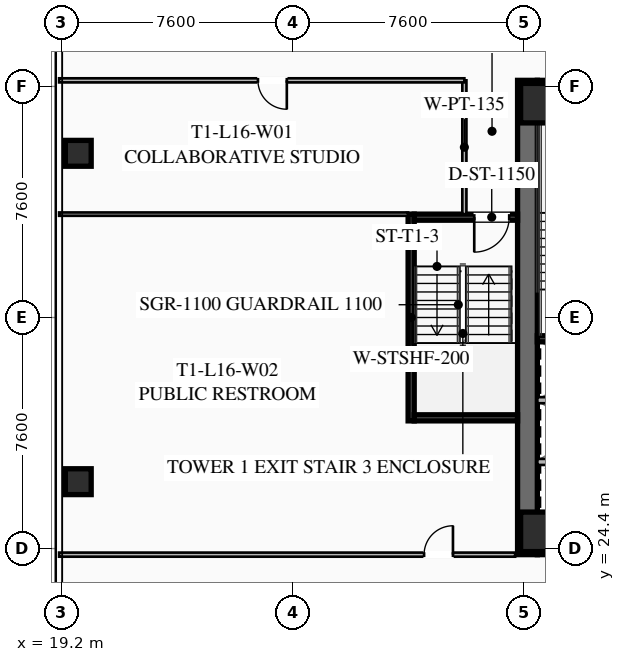
"""IFC4 building model, lengths in metres.
Left out: names, types, materials, properties, quantities, classifications, styles, units other than length and angle.
Written with IfcOpenShell. Run it as: python <this file> out.ifc"""

import sys

from ifc_helpers import new_model, si_unit, direction, frame, frame_2d, origin, origin_2d, place, context, subcontext, project, spatial, rectangle, hollow_rectangle, extrude, element, fill, save


model = new_model("IFC4")
c1 = context("Model", 3, precision=1e-05, world=origin(), true_north=direction((0.0, 1.0)))
c2 = subcontext(c1, "Body", "Model", "MODEL_VIEW")
j1 = project(units=[si_unit("LENGTHUNIT", "METRE"), si_unit("PLANEANGLEUNIT", "RADIAN")], contexts=[c1])
p1 = place(None, origin())
s1 = spatial("IfcSite", under=j1, at=p1, CompositionType="ELEMENT")
p2 = place(p1, origin())
s2 = spatial("IfcBuilding", under=s1, at=p2, CompositionType="ELEMENT")
p3 = place(p2, frame((0.0, 0.0, 63.65)))
s3 = spatial("IfcBuildingStorey", under=s2, at=p3, CompositionType="ELEMENT", Elevation=63.65)
p4 = place(p3, frame((34.525, 24.2, 0.0), z_axis=(0.0, 0.0, 1.0), x_axis=(0.0, 1.0, 0.0)))
e1 = element("IfcWall", 1, at=p4, inside=s3, PredefinedType="SHEAR", context=c2, shape_type="SweptSolid", body=[
    extrude(rectangle(XDim=15.6, YDim=0.65, at=frame_2d((7.8, 0.0))), origin(), (0.0, 0.0, 1.0), 3.55),
])
p5 = place(p3, frame((49.15, 24.525, 0.0), z_axis=(0.0, 0.0, 1.0), x_axis=(-1.0, 0.0, 0.0)))
e2 = element("IfcWall", 2, at=p5, inside=s3, PredefinedType="SHEAR", context=c2, shape_type="SweptSolid", body=[
    extrude(rectangle(XDim=14.3, YDim=0.65, at=frame_2d((7.15, 0.0))), origin(), (0.0, 0.0, 1.0), 3.55),
])
p6 = place(p5, frame((8.85, 0.0, 0.0)))
e3 = element("IfcOpeningElement", 3, at=p6, cuts=e2, PredefinedType="OPENING", context=c2, shape_type="SweptSolid", body=[
    extrude(rectangle(XDim=1.25, YDim=2.25, at=frame_2d((0.625, 1.125))), frame((0.0, 0.335, 0.0), z_axis=(0.0, -1.0, 0.0), x_axis=(1.0, 0.0, 0.0)), (0.0, 0.0, 1.0), 0.67),
])
p7 = place(p5, frame((3.8, 0.0, 0.0)))
e4 = element("IfcOpeningElement", 4, at=p7, cuts=e2, PredefinedType="OPENING", context=c2, shape_type="SweptSolid", body=[
    extrude(rectangle(XDim=1.25, YDim=2.25, at=frame_2d((0.625, 1.125))), frame((0.0, 0.335, 0.0), z_axis=(0.0, -1.0, 0.0), x_axis=(1.0, 0.0, 0.0)), (0.0, 0.0, 1.0), 0.67),
])
p8 = place(p3, frame((34.85, 39.475, 0.0), z_axis=(0.0, 0.0, 1.0), x_axis=(1.0, 0.0, 0.0)))
e5 = element("IfcWall", 5, at=p8, inside=s3, PredefinedType="SHEAR", context=c2, shape_type="SweptSolid", body=[
    extrude(rectangle(XDim=14.3, YDim=0.65, at=frame_2d((7.15, 0.0))), origin(), (0.0, 0.0, 1.0), 3.55),
])
p9 = place(p8, frame((4.2, 0.0, 0.0)))
e6 = element("IfcOpeningElement", 6, at=p9, cuts=e5, PredefinedType="OPENING", context=c2, shape_type="SweptSolid", body=[
    extrude(rectangle(XDim=1.25, YDim=2.25, at=frame_2d((0.625, 1.125))), frame((0.0, 0.335, 0.0), z_axis=(0.0, -1.0, 0.0), x_axis=(1.0, 0.0, 0.0)), (0.0, 0.0, 1.0), 0.67),
])
p10 = place(p8, frame((9.25, 0.0, 0.0)))
e7 = element("IfcOpeningElement", 7, at=p10, cuts=e5, PredefinedType="OPENING", context=c2, shape_type="SweptSolid", body=[
    extrude(rectangle(XDim=1.25, YDim=2.25, at=frame_2d((0.625, 1.125))), frame((0.0, 0.335, 0.0), z_axis=(0.0, -1.0, 0.0), x_axis=(1.0, 0.0, 0.0)), (0.0, 0.0, 1.0), 0.67),
])
for number, where, z_axis, x_axis in (
    (8, (34.95, 24.95, 0.0), (0.0, 0.0, 1.0), (1.0, 0.0, 0.0)),
    (9, (34.95, 39.05, 0.0), (0.0, 0.0, 1.0), (1.0, 0.0, 0.0)),
):
    element("IfcColumn", number, at=place(p3, frame(where, z_axis=z_axis, x_axis=x_axis)), inside=s3, PredefinedType="COLUMN", context=c2, shape_type="SweptSolid", body=[
        extrude(hollow_rectangle(XDim=1.3, YDim=1.3, WallThickness=0.05, at=origin_2d()), origin(), (0.0, 0.0, 1.0), 3.35),
    ])
for number, where, z_axis, x_axis in (
    (10, (19.75, 37.4, 0.0), (0.0, 0.0, 1.0), (1.0, 0.0, 0.0)),
    (11, (19.75, 26.6, 0.0), (0.0, 0.0, 1.0), (1.0, 0.0, 0.0)),
):
    element("IfcColumn", number, at=place(p3, frame(where, z_axis=z_axis, x_axis=x_axis)), inside=s3, PredefinedType="COLUMN", context=c2, shape_type="SweptSolid", body=[
        extrude(hollow_rectangle(XDim=0.85, YDim=0.85, WallThickness=0.035, at=origin_2d()), origin(), (0.0, 0.0, 1.0), 3.35),
    ])
for number, where, z_axis, x_axis in (
    (12, (34.85, 31.3, 0.0), (0.0, 0.0, 1.0), (1.0, 0.0, 0.0)),
    (13, (34.85, 38.7, 0.0), (0.0, 0.0, 1.0), (1.0, 0.0, 0.0)),
):
    element("IfcWall", number, at=place(p3, frame(where, z_axis=z_axis, x_axis=x_axis)), inside=s3, PredefinedType="SHEAR", context=c2, shape_type="SweptSolid", body=[
        extrude(rectangle(XDim=3.45, YDim=0.2, at=frame_2d((1.725, 0.0))), origin(), (0.0, 0.0, 1.0), 3.35),
    ])
for number, where, z_axis, x_axis in (
    (14, (34.85, 27.25, 0.0), (0.0, 0.0, 1.0), (1.0, 0.0, 0.0)),
    (15, (34.85, 29.28, 0.0), (0.0, 0.0, 1.0), (1.0, 0.0, 0.0)),
):
    element("IfcWall", number, at=place(p3, frame(where, z_axis=z_axis, x_axis=x_axis)), inside=s3, PredefinedType="SOLIDWALL", context=c2, shape_type="SweptSolid", body=[
        extrude(rectangle(XDim=3.1, YDim=0.2, at=frame_2d((1.55, 0.0))), origin(), (0.0, 0.0, 1.0), 3.35),
    ])
p11 = place(p3, frame((30.7, 28.6, 0.0), z_axis=(0.0, 0.0, 1.0), x_axis=(0.0, 1.0, 0.0)))
e16 = element("IfcWall", 16, at=p11, inside=s3, PredefinedType="SHEAR", context=c2, shape_type="SweptSolid", body=[
    extrude(rectangle(XDim=6.8, YDim=0.2, at=frame_2d((3.4, 0.0))), origin(), (0.0, 0.0, 1.0), 3.35),
])
p12 = place(p3, frame((34.2, 35.3, 0.0), z_axis=(0.0, 0.0, 1.0), x_axis=(-1.0, 0.0, 0.0)))
e17 = element("IfcWall", 17, at=p12, inside=s3, PredefinedType="SHEAR", context=c2, shape_type="SweptSolid", body=[
    extrude(rectangle(XDim=3.4, YDim=0.2, at=frame_2d((1.7, 0.0))), origin(), (0.0, 0.0, 1.0), 3.35),
])
p13 = place(p12, frame((0.275, 0.0, 0.0)))
e18 = element("IfcOpeningElement", 18, at=p13, cuts=e17, PredefinedType="OPENING", context=c2, shape_type="SweptSolid", body=[
    extrude(rectangle(XDim=1.15, YDim=2.2, at=frame_2d((0.575, 1.1))), frame((0.0, 0.11, 0.0), z_axis=(0.0, -1.0, 0.0), x_axis=(1.0, 0.0, 0.0)), (0.0, 0.0, 1.0), 0.22),
])
p14 = place(p3, frame((30.8, 28.7, 0.0), z_axis=(0.0, 0.0, 1.0), x_axis=(1.0, 0.0, 0.0)))
e19 = element("IfcWall", 19, at=p14, inside=s3, PredefinedType="SHEAR", context=c2, shape_type="SweptSolid", body=[
    extrude(rectangle(XDim=3.4, YDim=0.2, at=frame_2d((1.7, 0.0))), origin(), (0.0, 0.0, 1.0), 3.35),
])
p15 = place(p3, frame((32.45, 35.4, 0.0), z_axis=(0.0, 0.0, 1.0), x_axis=(0.0, 1.0, 0.0)))
e20 = element("IfcWall", 20, at=p15, inside=s3, PredefinedType="PARTITIONING", context=c2, shape_type="SweptSolid", body=[
    extrude(rectangle(XDim=4.4, YDim=0.135, at=frame_2d((2.2, 0.0))), origin(), (0.0, 0.0, 1.0), 2.493),
])
p16 = place(p3, frame((32.45, 39.8, 0.0), z_axis=(0.0, 0.0, 1.0), x_axis=(-1.0, 0.0, 0.0)))
e21 = element("IfcWall", 21, at=p16, inside=s3, PredefinedType="PARTITIONING", context=c2, shape_type="SweptSolid", body=[
    extrude(rectangle(XDim=13.33, YDim=0.135, at=frame_2d((6.665, 0.0))), origin(), (0.0, 0.0, 1.0), 2.493),
])
p17 = place(p16, frame((5.84, 0.0, 0.0)))
e22 = element("IfcOpeningElement", 22, at=p17, cuts=e21, PredefinedType="OPENING", context=c2, shape_type="SweptSolid", body=[
    extrude(rectangle(XDim=0.95, YDim=2.05, at=frame_2d((0.475, 1.025))), frame((0.0, 0.077, 0.0), z_axis=(0.0, -1.0, 0.0), x_axis=(1.0, 0.0, 0.0)), (0.0, 0.0, 1.0), 0.155),
])
p18 = place(p3, frame((19.12, 24.2, 0.0), z_axis=(0.0, 0.0, 1.0), x_axis=(1.0, 0.0, 0.0)))
e23 = element("IfcWall", 23, at=p18, inside=s3, PredefinedType="PARTITIONING", context=c2, shape_type="SweptSolid", body=[
    extrude(rectangle(XDim=15.0, YDim=0.135, at=frame_2d((7.5, 0.0))), origin(), (0.0, 0.0, 1.0), 2.493),
])
p19 = place(p18, frame((12.005, 0.0, 0.0)))
e24 = element("IfcOpeningElement", 24, at=p19, cuts=e23, PredefinedType="OPENING", context=c2, shape_type="SweptSolid", body=[
    extrude(rectangle(XDim=0.95, YDim=2.05, at=frame_2d((0.475, 1.025))), frame((0.0, 0.077, 0.0), z_axis=(0.0, -1.0, 0.0), x_axis=(1.0, 0.0, 0.0)), (0.0, 0.0, 1.0), 0.155),
])
p20 = place(p3, frame((30.6, 35.4, 0.0), z_axis=(0.0, 0.0, 1.0), x_axis=(-1.0, 0.0, 0.0)))
e25 = element("IfcWall", 25, at=p20, inside=s3, PredefinedType="PARTITIONING", context=c2, shape_type="SweptSolid", body=[
    extrude(rectangle(XDim=11.48, YDim=0.11, at=frame_2d((5.74, 0.0))), origin(), (0.0, 0.0, 1.0), 2.493),
])
p21 = place(p13, origin())
e26 = element("IfcDoor", 26, at=p21, inside=s3, OperationType="SINGLE_SWING_RIGHT", PredefinedType="DOOR", context=c2, shape_type="SweptSolid", body=[
    extrude(rectangle(XDim=1.15, YDim=2.2, at=frame_2d((0.575, 1.1))), frame((0.0, 0.025, 0.0), z_axis=(0.0, -1.0, 0.0), x_axis=(1.0, 0.0, 0.0)), (0.0, 0.0, 1.0), 0.05),
])
fill(e18, e26)
p22 = place(p17, origin())
e27 = element("IfcDoor", 27, at=p22, inside=s3, OperationType="SINGLE_SWING_LEFT", PredefinedType="DOOR", context=c2, shape_type="SweptSolid", body=[
    extrude(rectangle(XDim=0.95, YDim=2.05, at=frame_2d((0.475, 1.025))), frame((0.0, 0.025, 0.0), z_axis=(0.0, -1.0, 0.0), x_axis=(1.0, 0.0, 0.0)), (0.0, 0.0, 1.0), 0.05),
])
fill(e22, e27)
p23 = place(p19, origin())
e28 = element("IfcDoor", 28, at=p23, inside=s3, OperationType="SINGLE_SWING_RIGHT", PredefinedType="DOOR", context=c2, shape_type="SweptSolid", body=[
    extrude(rectangle(XDim=0.95, YDim=2.05, at=frame_2d((0.475, 1.025))), frame((0.0, 0.025, 0.0), z_axis=(0.0, -1.0, 0.0), x_axis=(1.0, 0.0, 0.0)), (0.0, 0.0, 1.0), 0.05),
])
fill(e24, e28)
save(model, sys.argv[1])
